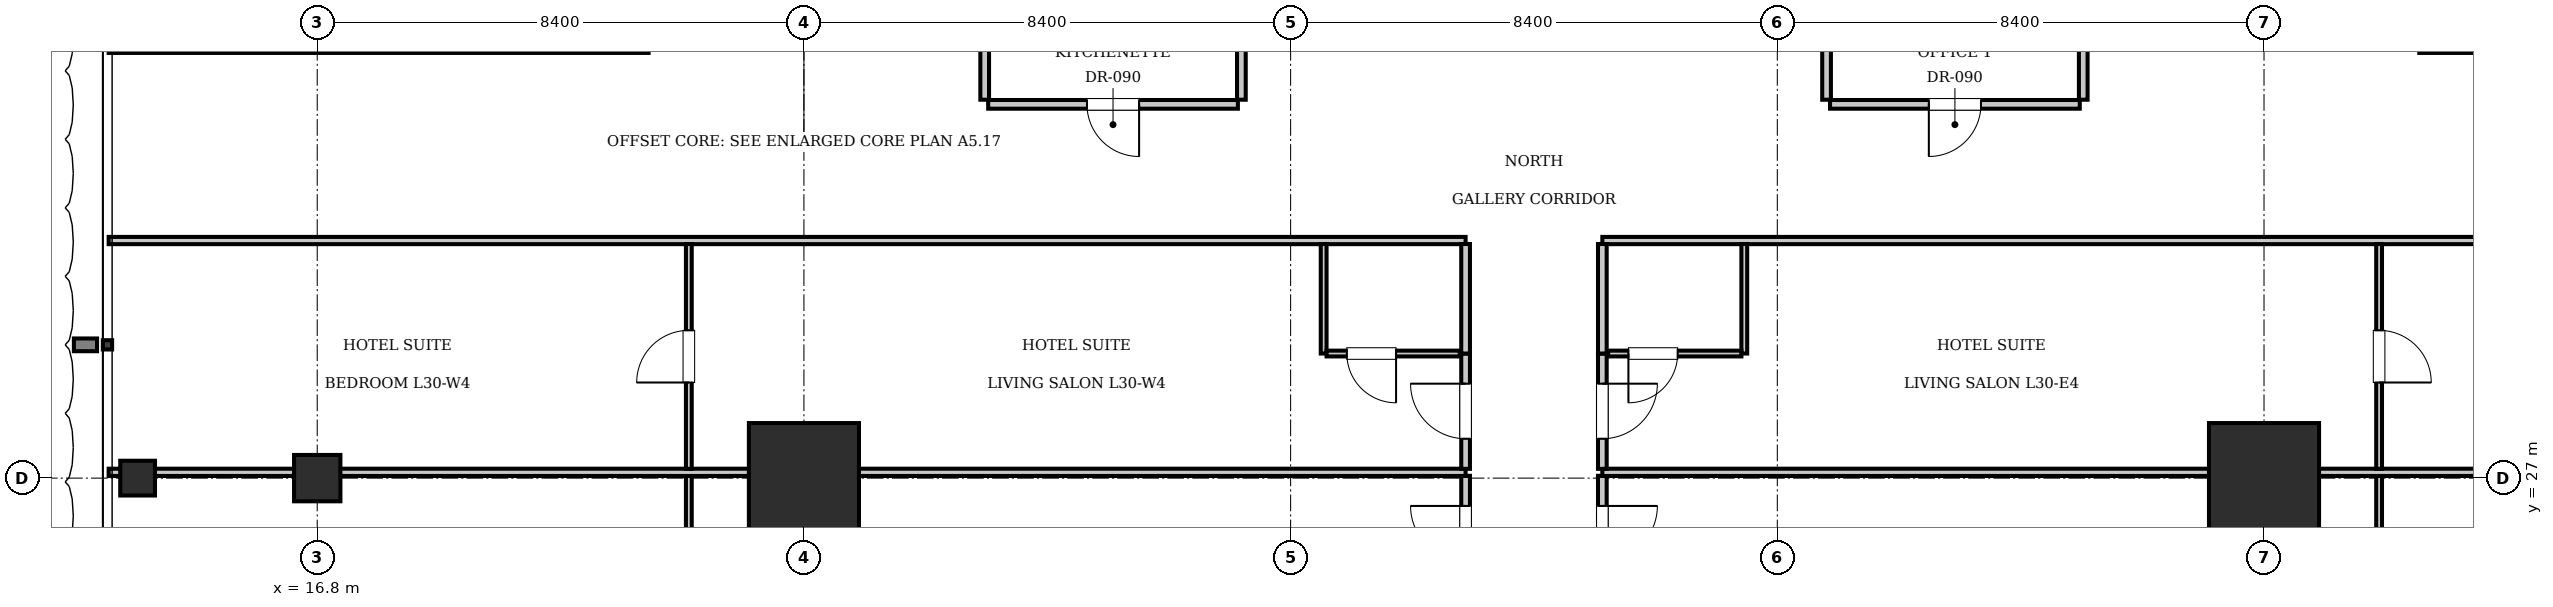
"""IFC4 building model, lengths in metres.
Left out: names, types, materials, properties, quantities, classifications, styles, units other than length and angle.
Written with IfcOpenShell. Run it as: python <this file> out.ifc"""

import sys

from ifc_helpers import new_model, si_unit, direction, frame, frame_2d, origin, origin_2d, place, context, subcontext, project, spatial, rectangle, i_section, extrude, element, fill, save


model = new_model("IFC4")
c1 = context("Model", 3, precision=1e-05, world=origin(), true_north=direction((0.0, 1.0)))
c2 = subcontext(c1, "Body", "Model", "MODEL_VIEW")
j1 = project(units=[si_unit("LENGTHUNIT", "METRE"), si_unit("PLANEANGLEUNIT", "RADIAN")], contexts=[c1])
p1 = place(None, origin())
s1 = spatial("IfcSite", under=j1, at=p1, CompositionType="ELEMENT")
p2 = place(p1, origin())
s2 = spatial("IfcBuilding", under=s1, at=p2, CompositionType="ELEMENT")
p3 = place(p2, frame((0.0, 0.0, 127.4)))
s3 = spatial("IfcBuildingStorey", under=s2, at=p3, CompositionType="ELEMENT", Elevation=127.4)
for number, where, z_axis, x_axis in (
    (1, (25.2, 27.0, 0.0), (0.0, 0.0, 1.0), (1.0, 0.0, 0.0)),
    (2, (50.4, 27.0, 0.0), (0.0, 0.0, 1.0), (1.0, 0.0, 0.0)),
):
    element("IfcColumn", number, at=place(p3, frame(where, z_axis=z_axis, x_axis=x_axis)), inside=s3, PredefinedType="COLUMN", context=c2, shape_type="SweptSolid", body=[
        extrude(rectangle(XDim=1.9, YDim=1.9, at=origin_2d()), origin(), (0.0, 0.0, 1.0), 3.85),
    ])
p4 = place(p3, frame((16.8, 27.0, 0.0), z_axis=(0.0, 0.0, 1.0), x_axis=(1.0, 0.0, 0.0)))
e3 = element("IfcColumn", 3, at=p4, inside=s3, PredefinedType="COLUMN", context=c2, shape_type="SweptSolid", body=[
    extrude(rectangle(XDim=0.8, YDim=0.8, at=origin_2d()), origin(), (0.0, 0.0, 1.0), 3.85),
])
p5 = place(p3, frame((13.7, 27.0, 0.0), z_axis=(0.0, 0.0, 1.0), x_axis=(1.0, 0.0, 0.0)))
e4 = element("IfcColumn", 4, at=p5, inside=s3, PredefinedType="COLUMN", context=c2, shape_type="SweptSolid", body=[
    extrude(i_section(OverallWidth=0.6, OverallDepth=0.6, WebThickness=0.025, FlangeThickness=0.038, at=origin_2d()), origin(), (0.0, 0.0, 1.0), 3.85),
])
for number, where, z_axis, x_axis in (
    (5, (28.32, 33.53, 0.0), (0.0, 0.0, 1.0), (0.0, 1.0, 0.0)),
    (6, (32.75, 33.53, 0.0), (0.0, 0.0, 1.0), (0.0, 1.0, 0.0)),
):
    element("IfcWall", number, at=place(p3, frame(where, z_axis=z_axis, x_axis=x_axis)), inside=s3, PredefinedType="PARTITIONING", context=c2, shape_type="SweptSolid", body=[
        extrude(rectangle(XDim=2.59, YDim=0.15, at=frame_2d((1.295, 0.0))), origin(), (0.0, 0.0, 1.0), 3.61),
    ])
p6 = place(p3, frame((28.38, 33.45, 0.0), z_axis=(0.0, 0.0, 1.0), x_axis=(1.0, 0.0, 0.0)))
e7 = element("IfcWall", 7, at=p6, inside=s3, PredefinedType="PARTITIONING", context=c2, shape_type="SweptSolid", body=[
    extrude(rectangle(XDim=4.31, YDim=0.15, at=frame_2d((2.155, 0.0))), origin(), (0.0, 0.0, 1.0), 3.61),
])
p7 = place(p6, frame((1.705, 0.0, 0.0)))
e8 = element("IfcOpeningElement", 8, at=p7, cuts=e7, PredefinedType="OPENING", context=c2, shape_type="SweptSolid", body=[
    extrude(rectangle(XDim=0.9, YDim=2.1, at=frame_2d((0.45, 1.05))), frame((0.0, 0.085, 0.0), z_axis=(0.0, -1.0, 0.0), x_axis=(1.0, 0.0, 0.0)), (0.0, 0.0, 1.0), 0.17),
])
for number, where, z_axis, x_axis in (
    (9, (42.85, 33.53, 0.0), (0.0, 0.0, 1.0), (0.0, 1.0, 0.0)),
    (10, (47.28, 33.53, 0.0), (0.0, 0.0, 1.0), (0.0, 1.0, 0.0)),
):
    element("IfcWall", number, at=place(p3, frame(where, z_axis=z_axis, x_axis=x_axis)), inside=s3, PredefinedType="PARTITIONING", context=c2, shape_type="SweptSolid", body=[
        extrude(rectangle(XDim=2.59, YDim=0.15, at=frame_2d((1.295, 0.0))), origin(), (0.0, 0.0, 1.0), 3.61),
    ])
p8 = place(p3, frame((42.91, 33.45, 0.0), z_axis=(0.0, 0.0, 1.0), x_axis=(1.0, 0.0, 0.0)))
e11 = element("IfcWall", 11, at=p8, inside=s3, PredefinedType="PARTITIONING", context=c2, shape_type="SweptSolid", body=[
    extrude(rectangle(XDim=4.31, YDim=0.15, at=frame_2d((2.155, 0.0))), origin(), (0.0, 0.0, 1.0), 3.61),
])
p9 = place(p8, frame((1.705, 0.0, 0.0)))
e12 = element("IfcOpeningElement", 12, at=p9, cuts=e11, PredefinedType="OPENING", context=c2, shape_type="SweptSolid", body=[
    extrude(rectangle(XDim=0.9, YDim=2.1, at=frame_2d((0.45, 1.05))), frame((0.0, 0.085, 0.0), z_axis=(0.0, -1.0, 0.0), x_axis=(1.0, 0.0, 0.0)), (0.0, 0.0, 1.0), 0.17),
])
p10 = place(p3, frame((13.2, 31.1, 0.0), z_axis=(0.0, 0.0, 1.0), x_axis=(1.0, 0.0, 0.0)))
e13 = element("IfcWall", 13, at=p10, inside=s3, PredefinedType="PARTITIONING", context=c2, shape_type="SweptSolid", body=[
    extrude(rectangle(XDim=23.42, YDim=0.125, at=frame_2d((11.71, 0.0))), origin(), (0.0, 0.0, 1.0), 3.61),
])
p11 = place(p3, frame((38.98, 31.1, 0.0), z_axis=(0.0, 0.0, 1.0), x_axis=(1.0, 0.0, 0.0)))
e14 = element("IfcWall", 14, at=p11, inside=s3, PredefinedType="PARTITIONING", context=c2, shape_type="SweptSolid", body=[
    extrude(rectangle(XDim=23.42, YDim=0.125, at=frame_2d((11.71, 0.0))), origin(), (0.0, 0.0, 1.0), 3.61),
])
p12 = place(p3, frame((36.62, 25.05, 0.0), z_axis=(0.0, 0.0, 1.0), x_axis=(0.0, 1.0, 0.0)))
e15 = element("IfcWall", 15, at=p12, inside=s3, PredefinedType="PARTITIONING", context=c2, shape_type="SweptSolid", body=[
    extrude(rectangle(XDim=1.99, YDim=0.15, at=frame_2d((0.995, 0.0))), origin(), (0.0, 0.0, 1.0), 3.61),
])
p13 = place(p12, frame((0.52, 0.0, 0.0)))
e16 = element("IfcOpeningElement", 16, at=p13, cuts=e15, PredefinedType="OPENING", context=c2, shape_type="SweptSolid", body=[
    extrude(rectangle(XDim=0.95, YDim=2.15, at=frame_2d((0.475, 1.075))), frame((0.0, 0.085, 0.0), z_axis=(0.0, -1.0, 0.0), x_axis=(1.0, 0.0, 0.0)), (0.0, 0.0, 1.0), 0.17),
])
p14 = place(p3, frame((23.214, 23.16, 0.0), z_axis=(0.0, 0.0, 1.0), x_axis=(0.0, 1.0, 0.0)))
e17 = element("IfcWall", 17, at=p14, inside=s3, PredefinedType="PARTITIONING", context=c2, shape_type="SweptSolid", body=[
    extrude(rectangle(XDim=3.88, YDim=0.1, at=frame_2d((1.94, 0.0))), origin(), (0.0, 0.0, 1.0), 3.61),
])
p15 = place(p14, frame((1.49, 0.0, 0.0)))
e18 = element("IfcOpeningElement", 18, at=p15, cuts=e17, PredefinedType="OPENING", context=c2, shape_type="SweptSolid", body=[
    extrude(rectangle(XDim=0.9, YDim=2.1, at=frame_2d((0.45, 1.05))), frame((0.0, 0.06, 0.0), z_axis=(0.0, -1.0, 0.0), x_axis=(1.0, 0.0, 0.0)), (0.0, 0.0, 1.0), 0.12),
])
p16 = place(p3, frame((38.98, 25.05, 0.0), z_axis=(0.0, 0.0, 1.0), x_axis=(0.0, 1.0, 0.0)))
e19 = element("IfcWall", 19, at=p16, inside=s3, PredefinedType="PARTITIONING", context=c2, shape_type="SweptSolid", body=[
    extrude(rectangle(XDim=1.99, YDim=0.15, at=frame_2d((0.995, 0.0))), origin(), (0.0, 0.0, 1.0), 3.61),
])
p17 = place(p16, frame((0.52, 0.0, 0.0)))
e20 = element("IfcOpeningElement", 20, at=p17, cuts=e19, PredefinedType="OPENING", context=c2, shape_type="SweptSolid", body=[
    extrude(rectangle(XDim=0.95, YDim=2.15, at=frame_2d((0.475, 1.075))), frame((0.0, 0.085, 0.0), z_axis=(0.0, -1.0, 0.0), x_axis=(1.0, 0.0, 0.0)), (0.0, 0.0, 1.0), 0.17),
])
p18 = place(p3, frame((52.386, 23.16, 0.0), z_axis=(0.0, 0.0, 1.0), x_axis=(0.0, 1.0, 0.0)))
e21 = element("IfcWall", 21, at=p18, inside=s3, PredefinedType="PARTITIONING", context=c2, shape_type="SweptSolid", body=[
    extrude(rectangle(XDim=3.88, YDim=0.1, at=frame_2d((1.94, 0.0))), origin(), (0.0, 0.0, 1.0), 3.61),
])
p19 = place(p18, frame((1.49, 0.0, 0.0)))
e22 = element("IfcOpeningElement", 22, at=p19, cuts=e21, PredefinedType="OPENING", context=c2, shape_type="SweptSolid", body=[
    extrude(rectangle(XDim=0.9, YDim=2.1, at=frame_2d((0.45, 1.05))), frame((0.0, 0.06, 0.0), z_axis=(0.0, -1.0, 0.0), x_axis=(1.0, 0.0, 0.0)), (0.0, 0.0, 1.0), 0.12),
])
p20 = place(p3, frame((13.2, 27.1, 0.0), z_axis=(0.0, 0.0, 1.0), x_axis=(1.0, 0.0, 0.0)))
e23 = element("IfcWall", 23, at=p20, inside=s3, PredefinedType="PARTITIONING", context=c2, shape_type="SweptSolid", body=[
    extrude(rectangle(XDim=23.42, YDim=0.125, at=frame_2d((11.71, 0.0))), origin(), (0.0, 0.0, 1.0), 2.41),
])
p21 = place(p3, frame((38.98, 27.1, 0.0), z_axis=(0.0, 0.0, 1.0), x_axis=(1.0, 0.0, 0.0)))
e24 = element("IfcWall", 24, at=p21, inside=s3, PredefinedType="PARTITIONING", context=c2, shape_type="SweptSolid", body=[
    extrude(rectangle(XDim=23.42, YDim=0.125, at=frame_2d((11.71, 0.0))), origin(), (0.0, 0.0, 1.0), 2.41),
])
p22 = place(p3, frame((36.62, 27.16, 0.0), z_axis=(0.0, 0.0, 1.0), x_axis=(0.0, 1.0, 0.0)))
e25 = element("IfcWall", 25, at=p22, inside=s3, PredefinedType="PARTITIONING", context=c2, shape_type="SweptSolid", body=[
    extrude(rectangle(XDim=1.99, YDim=0.15, at=frame_2d((0.995, 0.0))), origin(), (0.0, 0.0, 1.0), 3.61),
])
p23 = place(p22, frame((0.52, 0.0, 0.0)))
e26 = element("IfcOpeningElement", 26, at=p23, cuts=e25, PredefinedType="OPENING", context=c2, shape_type="SweptSolid", body=[
    extrude(rectangle(XDim=0.95, YDim=2.15, at=frame_2d((0.475, 1.075))), frame((0.0, 0.085, 0.0), z_axis=(0.0, -1.0, 0.0), x_axis=(1.0, 0.0, 0.0)), (0.0, 0.0, 1.0), 0.17),
])
p24 = place(p3, frame((36.62, 29.15, 0.0), z_axis=(0.0, 0.0, 1.0), x_axis=(0.0, 1.0, 0.0)))
e27 = element("IfcWall", 27, at=p24, inside=s3, PredefinedType="PARTITIONING", context=c2, shape_type="SweptSolid", body=[
    extrude(rectangle(XDim=1.89, YDim=0.15, at=frame_2d((0.945, 0.0))), origin(), (0.0, 0.0, 1.0), 3.61),
])
p25 = place(p3, frame((34.17, 29.15, 0.0), z_axis=(0.0, 0.0, 1.0), x_axis=(0.0, 1.0, 0.0)))
e28 = element("IfcWall", 28, at=p25, inside=s3, PredefinedType="PARTITIONING", context=c2, shape_type="SweptSolid", body=[
    extrude(rectangle(XDim=1.89, YDim=0.1, at=frame_2d((0.945, 0.0))), origin(), (0.0, 0.0, 1.0), 3.61),
])
p26 = place(p3, frame((34.22, 29.15, 0.0), z_axis=(0.0, 0.0, 1.0), x_axis=(1.0, 0.0, 0.0)))
e29 = element("IfcWall", 29, at=p26, inside=s3, PredefinedType="PARTITIONING", context=c2, shape_type="SweptSolid", body=[
    extrude(rectangle(XDim=2.3, YDim=0.1, at=frame_2d((1.15, 0.0))), origin(), (0.0, 0.0, 1.0), 3.61),
])
p27 = place(p26, frame((0.35, 0.0, 0.0)))
e30 = element("IfcOpeningElement", 30, at=p27, cuts=e29, PredefinedType="OPENING", context=c2, shape_type="SweptSolid", body=[
    extrude(rectangle(XDim=0.85, YDim=2.1, at=frame_2d((0.425, 1.05))), frame((0.0, 0.06, 0.0), z_axis=(0.0, -1.0, 0.0), x_axis=(1.0, 0.0, 0.0)), (0.0, 0.0, 1.0), 0.12),
])
p28 = place(p3, frame((23.214, 27.16, 0.0), z_axis=(0.0, 0.0, 1.0), x_axis=(0.0, 1.0, 0.0)))
e31 = element("IfcWall", 31, at=p28, inside=s3, PredefinedType="PARTITIONING", context=c2, shape_type="SweptSolid", body=[
    extrude(rectangle(XDim=3.88, YDim=0.1, at=frame_2d((1.94, 0.0))), origin(), (0.0, 0.0, 1.0), 3.61),
])
p29 = place(p28, frame((1.49, 0.0, 0.0)))
e32 = element("IfcOpeningElement", 32, at=p29, cuts=e31, PredefinedType="OPENING", context=c2, shape_type="SweptSolid", body=[
    extrude(rectangle(XDim=0.9, YDim=2.1, at=frame_2d((0.45, 1.05))), frame((0.0, 0.06, 0.0), z_axis=(0.0, -1.0, 0.0), x_axis=(1.0, 0.0, 0.0)), (0.0, 0.0, 1.0), 0.12),
])
p30 = place(p3, frame((38.98, 27.16, 0.0), z_axis=(0.0, 0.0, 1.0), x_axis=(0.0, 1.0, 0.0)))
e33 = element("IfcWall", 33, at=p30, inside=s3, PredefinedType="PARTITIONING", context=c2, shape_type="SweptSolid", body=[
    extrude(rectangle(XDim=1.99, YDim=0.15, at=frame_2d((0.995, 0.0))), origin(), (0.0, 0.0, 1.0), 3.61),
])
p31 = place(p30, frame((0.52, 0.0, 0.0)))
e34 = element("IfcOpeningElement", 34, at=p31, cuts=e33, PredefinedType="OPENING", context=c2, shape_type="SweptSolid", body=[
    extrude(rectangle(XDim=0.95, YDim=2.15, at=frame_2d((0.475, 1.075))), frame((0.0, 0.085, 0.0), z_axis=(0.0, -1.0, 0.0), x_axis=(1.0, 0.0, 0.0)), (0.0, 0.0, 1.0), 0.17),
])
p32 = place(p3, frame((38.98, 29.15, 0.0), z_axis=(0.0, 0.0, 1.0), x_axis=(0.0, 1.0, 0.0)))
e35 = element("IfcWall", 35, at=p32, inside=s3, PredefinedType="PARTITIONING", context=c2, shape_type="SweptSolid", body=[
    extrude(rectangle(XDim=1.89, YDim=0.15, at=frame_2d((0.945, 0.0))), origin(), (0.0, 0.0, 1.0), 3.61),
])
p33 = place(p3, frame((41.43, 29.15, 0.0), z_axis=(0.0, 0.0, 1.0), x_axis=(0.0, 1.0, 0.0)))
e36 = element("IfcWall", 36, at=p33, inside=s3, PredefinedType="PARTITIONING", context=c2, shape_type="SweptSolid", body=[
    extrude(rectangle(XDim=1.89, YDim=0.1, at=frame_2d((0.945, 0.0))), origin(), (0.0, 0.0, 1.0), 3.61),
])
p34 = place(p3, frame((39.08, 29.15, 0.0), z_axis=(0.0, 0.0, 1.0), x_axis=(1.0, 0.0, 0.0)))
e37 = element("IfcWall", 37, at=p34, inside=s3, PredefinedType="PARTITIONING", context=c2, shape_type="SweptSolid", body=[
    extrude(rectangle(XDim=2.3, YDim=0.1, at=frame_2d((1.15, 0.0))), origin(), (0.0, 0.0, 1.0), 3.61),
])
p35 = place(p34, frame((0.35, 0.0, 0.0)))
e38 = element("IfcOpeningElement", 38, at=p35, cuts=e37, PredefinedType="OPENING", context=c2, shape_type="SweptSolid", body=[
    extrude(rectangle(XDim=0.85, YDim=2.1, at=frame_2d((0.425, 1.05))), frame((0.0, 0.06, 0.0), z_axis=(0.0, -1.0, 0.0), x_axis=(1.0, 0.0, 0.0)), (0.0, 0.0, 1.0), 0.12),
])
p36 = place(p3, frame((52.386, 27.16, 0.0), z_axis=(0.0, 0.0, 1.0), x_axis=(0.0, 1.0, 0.0)))
e39 = element("IfcWall", 39, at=p36, inside=s3, PredefinedType="PARTITIONING", context=c2, shape_type="SweptSolid", body=[
    extrude(rectangle(XDim=3.88, YDim=0.1, at=frame_2d((1.94, 0.0))), origin(), (0.0, 0.0, 1.0), 3.61),
])
p37 = place(p36, frame((1.49, 0.0, 0.0)))
e40 = element("IfcOpeningElement", 40, at=p37, cuts=e39, PredefinedType="OPENING", context=c2, shape_type="SweptSolid", body=[
    extrude(rectangle(XDim=0.9, YDim=2.1, at=frame_2d((0.45, 1.05))), frame((0.0, 0.06, 0.0), z_axis=(0.0, -1.0, 0.0), x_axis=(1.0, 0.0, 0.0)), (0.0, 0.0, 1.0), 0.12),
])
p38 = place(p3, frame((13.2, 34.4, 0.0), z_axis=(0.0, 0.0, 1.0), x_axis=(1.0, 0.0, 0.0)))
e41 = element("IfcWall", 41, at=p38, inside=s3, PredefinedType="PARTITIONING", context=c2, shape_type="SweptSolid", body=[
    extrude(rectangle(XDim=9.32, YDim=0.125, at=frame_2d((4.66, 0.0))), origin(), (0.0, 0.0, 1.0), 3.61),
])
p39 = place(p3, frame((53.08, 34.4, 0.0), z_axis=(0.0, 0.0, 1.0), x_axis=(1.0, 0.0, 0.0)))
e42 = element("IfcWall", 42, at=p39, inside=s3, PredefinedType="PARTITIONING", context=c2, shape_type="SweptSolid", body=[
    extrude(rectangle(XDim=9.32, YDim=0.125, at=frame_2d((4.66, 0.0))), origin(), (0.0, 0.0, 1.0), 3.61),
])
p40 = place(p7, frame((0.9, 0.0, 0.0), z_axis=(0.0, 0.0, 1.0), x_axis=(-1.0, 0.0, 0.0)))
e43 = element("IfcDoor", 43, at=p40, inside=s3, OperationType="SINGLE_SWING_LEFT", PredefinedType="DOOR", context=c2, shape_type="SweptSolid", body=[
    extrude(rectangle(XDim=0.9, YDim=2.1, at=frame_2d((0.45, 1.05))), frame((0.0, 0.025, 0.0), z_axis=(0.0, -1.0, 0.0), x_axis=(1.0, 0.0, 0.0)), (0.0, 0.0, 1.0), 0.05),
])
fill(e8, e43)
p41 = place(p9, frame((0.9, 0.0, 0.0), z_axis=(0.0, 0.0, 1.0), x_axis=(-1.0, 0.0, 0.0)))
e44 = element("IfcDoor", 44, at=p41, inside=s3, OperationType="SINGLE_SWING_RIGHT", PredefinedType="DOOR", context=c2, shape_type="SweptSolid", body=[
    extrude(rectangle(XDim=0.9, YDim=2.1, at=frame_2d((0.45, 1.05))), frame((0.0, 0.025, 0.0), z_axis=(0.0, -1.0, 0.0), x_axis=(1.0, 0.0, 0.0)), (0.0, 0.0, 1.0), 0.05),
])
fill(e12, e44)
p42 = place(p13, origin())
e45 = element("IfcDoor", 45, at=p42, inside=s3, OperationType="SINGLE_SWING_RIGHT", PredefinedType="DOOR", context=c2, shape_type="SweptSolid", body=[
    extrude(rectangle(XDim=0.95, YDim=2.15, at=frame_2d((0.475, 1.075))), frame((0.0, 0.025, 0.0), z_axis=(0.0, -1.0, 0.0), x_axis=(1.0, 0.0, 0.0)), (0.0, 0.0, 1.0), 0.05),
])
fill(e16, e45)
p43 = place(p17, frame((0.95, 0.0, 0.0), z_axis=(0.0, 0.0, 1.0), x_axis=(-1.0, 0.0, 0.0)))
e46 = element("IfcDoor", 46, at=p43, inside=s3, OperationType="SINGLE_SWING_LEFT", PredefinedType="DOOR", context=c2, shape_type="SweptSolid", body=[
    extrude(rectangle(XDim=0.95, YDim=2.15, at=frame_2d((0.475, 1.075))), frame((0.0, 0.025, 0.0), z_axis=(0.0, -1.0, 0.0), x_axis=(1.0, 0.0, 0.0)), (0.0, 0.0, 1.0), 0.05),
])
fill(e20, e46)
p44 = place(p27, frame((0.85, 0.0, 0.0), z_axis=(0.0, 0.0, 1.0), x_axis=(-1.0, 0.0, 0.0)))
e47 = element("IfcDoor", 47, at=p44, inside=s3, OperationType="SINGLE_SWING_LEFT", PredefinedType="DOOR", context=c2, shape_type="SweptSolid", body=[
    extrude(rectangle(XDim=0.85, YDim=2.1, at=frame_2d((0.425, 1.05))), frame((0.0, 0.025, 0.0), z_axis=(0.0, -1.0, 0.0), x_axis=(1.0, 0.0, 0.0)), (0.0, 0.0, 1.0), 0.05),
])
fill(e30, e47)
p45 = place(p23, origin())
e48 = element("IfcDoor", 48, at=p45, inside=s3, OperationType="SINGLE_SWING_RIGHT", PredefinedType="DOOR", context=c2, shape_type="SweptSolid", body=[
    extrude(rectangle(XDim=0.95, YDim=2.15, at=frame_2d((0.475, 1.075))), frame((0.0, 0.025, 0.0), z_axis=(0.0, -1.0, 0.0), x_axis=(1.0, 0.0, 0.0)), (0.0, 0.0, 1.0), 0.05),
])
fill(e26, e48)
p46 = place(p29, origin())
e49 = element("IfcDoor", 49, at=p46, inside=s3, OperationType="SINGLE_SWING_LEFT", PredefinedType="DOOR", context=c2, shape_type="SweptSolid", body=[
    extrude(rectangle(XDim=0.9, YDim=2.1, at=frame_2d((0.45, 1.05))), frame((0.0, 0.025, 0.0), z_axis=(0.0, -1.0, 0.0), x_axis=(1.0, 0.0, 0.0)), (0.0, 0.0, 1.0), 0.05),
])
fill(e32, e49)
p47 = place(p35, frame((0.85, 0.0, 0.0), z_axis=(0.0, 0.0, 1.0), x_axis=(-1.0, 0.0, 0.0)))
e50 = element("IfcDoor", 50, at=p47, inside=s3, OperationType="SINGLE_SWING_RIGHT", PredefinedType="DOOR", context=c2, shape_type="SweptSolid", body=[
    extrude(rectangle(XDim=0.85, YDim=2.1, at=frame_2d((0.425, 1.05))), frame((0.0, 0.025, 0.0), z_axis=(0.0, -1.0, 0.0), x_axis=(1.0, 0.0, 0.0)), (0.0, 0.0, 1.0), 0.05),
])
fill(e38, e50)
p48 = place(p31, frame((0.95, 0.0, 0.0), z_axis=(0.0, 0.0, 1.0), x_axis=(-1.0, 0.0, 0.0)))
e51 = element("IfcDoor", 51, at=p48, inside=s3, OperationType="SINGLE_SWING_LEFT", PredefinedType="DOOR", context=c2, shape_type="SweptSolid", body=[
    extrude(rectangle(XDim=0.95, YDim=2.15, at=frame_2d((0.475, 1.075))), frame((0.0, 0.025, 0.0), z_axis=(0.0, -1.0, 0.0), x_axis=(1.0, 0.0, 0.0)), (0.0, 0.0, 1.0), 0.05),
])
fill(e34, e51)
p49 = place(p37, frame((0.9, 0.0, 0.0), z_axis=(0.0, 0.0, 1.0), x_axis=(-1.0, 0.0, 0.0)))
e52 = element("IfcDoor", 52, at=p49, inside=s3, OperationType="SINGLE_SWING_RIGHT", PredefinedType="DOOR", context=c2, shape_type="SweptSolid", body=[
    extrude(rectangle(XDim=0.9, YDim=2.1, at=frame_2d((0.45, 1.05))), frame((0.0, 0.025, 0.0), z_axis=(0.0, -1.0, 0.0), x_axis=(1.0, 0.0, 0.0)), (0.0, 0.0, 1.0), 0.05),
])
fill(e40, e52)
save(model, sys.argv[1])
